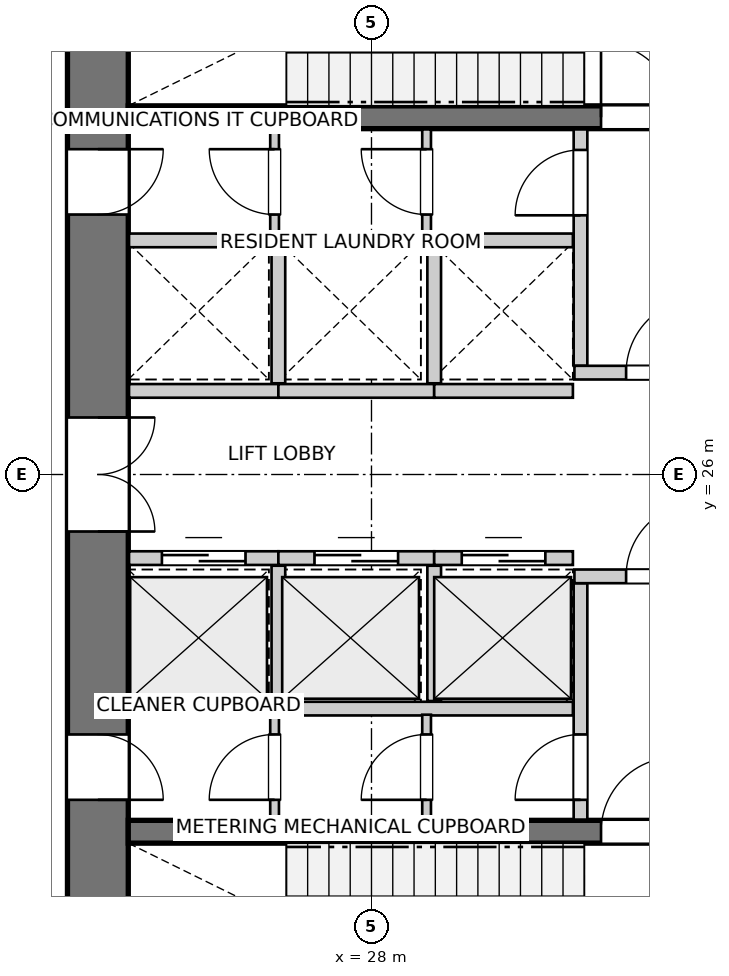
"""IFC4 building model, lengths in metres.
Left out: names, types, materials, properties, quantities, classifications, styles, units other than length and angle.
Written with IfcOpenShell. Run it as: python <this file> out.ifc"""

import sys

from ifc_helpers import new_model, si_unit, direction, frame, frame_2d, origin, place, context, subcontext, project, spatial, rectangle, extrude, source, transform, mapped, element, fill, save


model = new_model("IFC4")
c1 = context("Model", 3, precision=1e-05, world=origin(), true_north=direction((0.0, 1.0)))
c2 = subcontext(c1, "Body", "Model", "MODEL_VIEW")
j1 = project(units=[si_unit("LENGTHUNIT", "METRE"), si_unit("PLANEANGLEUNIT", "RADIAN")], contexts=[c1])
p1 = place(None, origin())
s1 = spatial("IfcSite", under=j1, at=p1, CompositionType="ELEMENT")
p2 = place(p1, origin())
s2 = spatial("IfcBuilding", under=s1, at=p2, CompositionType="ELEMENT")
p3 = place(p2, frame((0.0, 0.0, 65.4)))
s3 = spatial("IfcBuildingStorey", under=s2, at=p3, CompositionType="ELEMENT", Elevation=65.4)
p4 = place(p3, frame((24.4, 33.8, 0.0), z_axis=(0.0, 0.0, 1.0), x_axis=(0.0, -1.0, 0.0)))
e1 = element("IfcWall", 1, at=p4, inside=s3, PredefinedType="SHEAR", context=c2, shape_type="SweptSolid", body=[
    extrude(rectangle(XDim=15.6, YDim=0.8, at=frame_2d((7.8, 0.0))), origin(), (0.0, 0.0, 1.0), 4.75),
])
p5 = place(p4, frame((7.05, 0.0, 0.0)))
e2 = element("IfcOpeningElement", 2, at=p5, cuts=e1, PredefinedType="OPENING", context=c2, shape_type="SweptSolid", body=[
    extrude(rectangle(XDim=1.5, YDim=2.15, at=frame_2d((0.75, 1.075))), frame((0.0, 0.41, 0.0), z_axis=(0.0, -1.0, 0.0), x_axis=(1.0, 0.0, 0.0)), (0.0, 0.0, 1.0), 0.82),
])
p6 = place(p4, frame((3.52, 0.0, 0.0)))
e3 = element("IfcOpeningElement", 3, at=p6, cuts=e1, PredefinedType="OPENING", context=c2, shape_type="SweptSolid", body=[
    extrude(rectangle(XDim=0.86, YDim=2.05, at=frame_2d((0.43, 1.025))), frame((0.0, 0.41, 0.0), z_axis=(0.0, -1.0, 0.0), x_axis=(1.0, 0.0, 0.0)), (0.0, 0.0, 1.0), 0.82),
])
p7 = place(p4, frame((11.22, 0.0, 0.0)))
e4 = element("IfcOpeningElement", 4, at=p7, cuts=e1, PredefinedType="OPENING", context=c2, shape_type="SweptSolid", body=[
    extrude(rectangle(XDim=0.86, YDim=2.05, at=frame_2d((0.43, 1.025))), frame((0.0, 0.41, 0.0), z_axis=(0.0, -1.0, 0.0), x_axis=(1.0, 0.0, 0.0)), (0.0, 0.0, 1.0), 0.82),
])
p8 = place(p3, frame((24.8, 21.3, 0.0), z_axis=(0.0, 0.0, 1.0), x_axis=(1.0, 0.0, 0.0)))
e5 = element("IfcWall", 5, at=p8, inside=s3, PredefinedType="SHEAR", context=c2, shape_type="SweptSolid", body=[
    extrude(rectangle(XDim=11.1, YDim=0.3, at=frame_2d((5.55, 0.0))), origin(), (0.0, 0.0, 1.0), 4.75),
])
p9 = place(p8, frame((6.22, 0.0, 0.0)))
e6 = element("IfcOpeningElement", 6, at=p9, cuts=e5, PredefinedType="OPENING", context=c2, shape_type="SweptSolid", body=[
    extrude(rectangle(XDim=0.98, YDim=2.15, at=frame_2d((0.49, 1.075))), frame((0.0, 0.16, 0.0), z_axis=(0.0, -1.0, 0.0), x_axis=(1.0, 0.0, 0.0)), (0.0, 0.0, 1.0), 0.32),
])
p10 = place(p8, frame((9.15, 0.0, 0.0)))
e7 = element("IfcOpeningElement", 7, at=p10, cuts=e5, PredefinedType="OPENING", context=c2, shape_type="SweptSolid", body=[
    extrude(rectangle(XDim=1.15, YDim=2.15, at=frame_2d((0.575, 1.075))), frame((0.0, 0.16, 0.0), z_axis=(0.0, -1.0, 0.0), x_axis=(1.0, 0.0, 0.0)), (0.0, 0.0, 1.0), 0.32),
])
p11 = place(p3, frame((24.8, 30.7, 0.0), z_axis=(0.0, 0.0, 1.0), x_axis=(1.0, 0.0, 0.0)))
e8 = element("IfcWall", 8, at=p11, inside=s3, PredefinedType="SHEAR", context=c2, shape_type="SweptSolid", body=[
    extrude(rectangle(XDim=11.1, YDim=0.3, at=frame_2d((5.55, 0.0))), origin(), (0.0, 0.0, 1.0), 4.75),
])
p12 = place(p11, frame((6.22, 0.0, 0.0)))
e9 = element("IfcOpeningElement", 9, at=p12, cuts=e8, PredefinedType="OPENING", context=c2, shape_type="SweptSolid", body=[
    extrude(rectangle(XDim=0.98, YDim=2.15, at=frame_2d((0.49, 1.075))), frame((0.0, 0.16, 0.0), z_axis=(0.0, -1.0, 0.0), x_axis=(1.0, 0.0, 0.0)), (0.0, 0.0, 1.0), 0.32),
])
p13 = place(p11, frame((9.15, 0.0, 0.0)))
e10 = element("IfcOpeningElement", 10, at=p13, cuts=e8, PredefinedType="OPENING", context=c2, shape_type="SweptSolid", body=[
    extrude(rectangle(XDim=1.15, YDim=2.15, at=frame_2d((0.575, 1.075))), frame((0.0, 0.16, 0.0), z_axis=(0.0, -1.0, 0.0), x_axis=(1.0, 0.0, 0.0)), (0.0, 0.0, 1.0), 0.32),
])
p14 = place(p3, frame((30.75, 21.46, 0.0), z_axis=(0.0, 0.0, 1.0), x_axis=(0.0, 1.0, 0.0)))
e11 = element("IfcWall", 11, at=p14, inside=s3, PredefinedType="PARTITIONING", context=c2, shape_type="SweptSolid", body=[
    extrude(rectangle(XDim=3.11, YDim=0.18, at=frame_2d((1.555, 0.0))), origin(), (0.0, 0.0, 1.0), 4.75),
])
p15 = place(p14, frame((0.26, 0.0, 0.0)))
e12 = element("IfcOpeningElement", 12, at=p15, cuts=e11, PredefinedType="OPENING", context=c2, shape_type="SweptSolid", body=[
    extrude(rectangle(XDim=0.86, YDim=2.05, at=frame_2d((0.43, 1.025))), frame((0.0, 0.1, 0.0), z_axis=(0.0, -1.0, 0.0), x_axis=(1.0, 0.0, 0.0)), (0.0, 0.0, 1.0), 0.2),
])
p16 = place(p3, frame((30.67, 24.66, 0.0), z_axis=(0.0, 0.0, 1.0), x_axis=(1.0, 0.0, 0.0)))
e13 = element("IfcWall", 13, at=p16, inside=s3, PredefinedType="PARTITIONING", context=c2, shape_type="SweptSolid", body=[
    extrude(rectangle(XDim=5.22, YDim=0.18, at=frame_2d((2.61, 0.0))), origin(), (0.0, 0.0, 1.0), 4.75),
])
p17 = place(p16, frame((0.68, 0.0, 0.0)))
e14 = element("IfcOpeningElement", 14, at=p17, cuts=e13, PredefinedType="OPENING", context=c2, shape_type="SweptSolid", body=[
    extrude(rectangle(XDim=0.98, YDim=2.15, at=frame_2d((0.49, 1.075))), frame((0.0, 0.1, 0.0), z_axis=(0.0, -1.0, 0.0), x_axis=(1.0, 0.0, 0.0)), (0.0, 0.0, 1.0), 0.2),
])
p18 = place(p3, frame((30.75, 27.43, 0.0), z_axis=(0.0, 0.0, 1.0), x_axis=(0.0, 1.0, 0.0)))
e15 = element("IfcWall", 15, at=p18, inside=s3, PredefinedType="PARTITIONING", context=c2, shape_type="SweptSolid", body=[
    extrude(rectangle(XDim=3.11, YDim=0.18, at=frame_2d((1.555, 0.0))), origin(), (0.0, 0.0, 1.0), 4.75),
])
p19 = place(p18, frame((1.98, 0.0, 0.0)))
e16 = element("IfcOpeningElement", 16, at=p19, cuts=e15, PredefinedType="OPENING", context=c2, shape_type="SweptSolid", body=[
    extrude(rectangle(XDim=0.86, YDim=2.05, at=frame_2d((0.43, 1.025))), frame((0.0, 0.1, 0.0), z_axis=(0.0, -1.0, 0.0), x_axis=(1.0, 0.0, 0.0)), (0.0, 0.0, 1.0), 0.2),
])
p20 = place(p3, frame((30.67, 27.34, 0.0), z_axis=(0.0, 0.0, 1.0), x_axis=(1.0, 0.0, 0.0)))
e17 = element("IfcWall", 17, at=p20, inside=s3, PredefinedType="PARTITIONING", context=c2, shape_type="SweptSolid", body=[
    extrude(rectangle(XDim=5.22, YDim=0.18, at=frame_2d((2.61, 0.0))), origin(), (0.0, 0.0, 1.0), 4.75),
])
p21 = place(p20, frame((0.68, 0.0, 0.0)))
e18 = element("IfcOpeningElement", 18, at=p21, cuts=e17, PredefinedType="OPENING", context=c2, shape_type="SweptSolid", body=[
    extrude(rectangle(XDim=0.98, YDim=2.15, at=frame_2d((0.49, 1.075))), frame((0.0, 0.1, 0.0), z_axis=(0.0, -1.0, 0.0), x_axis=(1.0, 0.0, 0.0)), (0.0, 0.0, 1.0), 0.2),
])
p22 = place(p3, frame((24.81, 22.92, 0.0), z_axis=(0.0, 0.0, 1.0), x_axis=(1.0, 0.0, 0.0)))
e19 = element("IfcWall", 19, at=p22, inside=s3, PredefinedType="PARTITIONING", context=c2, shape_type="SweptSolid", body=[
    extrude(rectangle(XDim=5.84, YDim=0.18, at=frame_2d((2.92, 0.0))), origin(), (0.0, 0.0, 1.0), 4.75),
])
p23 = place(p3, frame((24.81, 24.9, 0.0), z_axis=(0.0, 0.0, 1.0), x_axis=(1.0, 0.0, 0.0)))
e20 = element("IfcWall", 20, at=p23, inside=s3, PredefinedType="PARTITIONING", context=c2, shape_type="SweptSolid", body=[
    extrude(rectangle(XDim=1.965, YDim=0.18, at=frame_2d((0.982, 0.0))), origin(), (0.0, 0.0, 1.0), 4.75),
])
p24 = place(p23, frame((0.433, 0.0, 0.0)))
e21 = element("IfcOpeningElement", 21, at=p24, cuts=e20, PredefinedType="OPENING", context=c2, shape_type="SweptSolid", body=[
    extrude(rectangle(XDim=1.1, YDim=2.15, at=frame_2d((0.55, 1.075))), frame((0.0, 0.1, 0.0), z_axis=(0.0, -1.0, 0.0), x_axis=(1.0, 0.0, 0.0)), (0.0, 0.0, 1.0), 0.2),
])
p25 = place(p3, frame((26.775, 24.9, 0.0), z_axis=(0.0, 0.0, 1.0), x_axis=(1.0, 0.0, 0.0)))
e22 = element("IfcWall", 22, at=p25, inside=s3, PredefinedType="PARTITIONING", context=c2, shape_type="SweptSolid", body=[
    extrude(rectangle(XDim=2.05, YDim=0.18, at=frame_2d((1.025, 0.0))), origin(), (0.0, 0.0, 1.0), 4.75),
])
p26 = place(p25, frame((0.475, 0.0, 0.0)))
e23 = element("IfcOpeningElement", 23, at=p26, cuts=e22, PredefinedType="OPENING", context=c2, shape_type="SweptSolid", body=[
    extrude(rectangle(XDim=1.1, YDim=2.15, at=frame_2d((0.55, 1.075))), frame((0.0, 0.1, 0.0), z_axis=(0.0, -1.0, 0.0), x_axis=(1.0, 0.0, 0.0)), (0.0, 0.0, 1.0), 0.2),
])
p27 = place(p3, frame((26.775, 23.02, 0.0), z_axis=(0.0, 0.0, 1.0), x_axis=(0.0, 1.0, 0.0)))
e24 = element("IfcWall", 24, at=p27, inside=s3, PredefinedType="PARTITIONING", context=c2, shape_type="SweptSolid", body=[
    extrude(rectangle(XDim=1.78, YDim=0.18, at=frame_2d((0.89, 0.0))), origin(), (0.0, 0.0, 1.0), 4.75),
])
p28 = place(p3, frame((28.825, 24.9, 0.0), z_axis=(0.0, 0.0, 1.0), x_axis=(1.0, 0.0, 0.0)))
e25 = element("IfcWall", 25, at=p28, inside=s3, PredefinedType="PARTITIONING", context=c2, shape_type="SweptSolid", body=[
    extrude(rectangle(XDim=1.825, YDim=0.18, at=frame_2d((0.913, 0.0))), origin(), (0.0, 0.0, 1.0), 4.75),
])
p29 = place(p28, frame((0.363, 0.0, 0.0)))
e26 = element("IfcOpeningElement", 26, at=p29, cuts=e25, PredefinedType="OPENING", context=c2, shape_type="SweptSolid", body=[
    extrude(rectangle(XDim=1.1, YDim=2.15, at=frame_2d((0.55, 1.075))), frame((0.0, 0.1, 0.0), z_axis=(0.0, -1.0, 0.0), x_axis=(1.0, 0.0, 0.0)), (0.0, 0.0, 1.0), 0.2),
])
p30 = place(p3, frame((28.825, 23.02, 0.0), z_axis=(0.0, 0.0, 1.0), x_axis=(0.0, 1.0, 0.0)))
e27 = element("IfcWall", 27, at=p30, inside=s3, PredefinedType="PARTITIONING", context=c2, shape_type="SweptSolid", body=[
    extrude(rectangle(XDim=1.78, YDim=0.18, at=frame_2d((0.89, 0.0))), origin(), (0.0, 0.0, 1.0), 4.75),
])
p31 = place(p3, frame((24.81, 29.08, 0.0), z_axis=(0.0, 0.0, 1.0), x_axis=(1.0, 0.0, 0.0)))
e28 = element("IfcWall", 28, at=p31, inside=s3, PredefinedType="PARTITIONING", context=c2, shape_type="SweptSolid", body=[
    extrude(rectangle(XDim=5.84, YDim=0.18, at=frame_2d((2.92, 0.0))), origin(), (0.0, 0.0, 1.0), 4.75),
])
p32 = place(p3, frame((24.81, 27.1, 0.0), z_axis=(0.0, 0.0, 1.0), x_axis=(1.0, 0.0, 0.0)))
e29 = element("IfcWall", 29, at=p32, inside=s3, PredefinedType="PARTITIONING", context=c2, shape_type="SweptSolid", body=[
    extrude(rectangle(XDim=1.965, YDim=0.18, at=frame_2d((0.982, 0.0))), origin(), (0.0, 0.0, 1.0), 4.75),
])
p33 = place(p3, frame((26.775, 27.1, 0.0), z_axis=(0.0, 0.0, 1.0), x_axis=(1.0, 0.0, 0.0)))
e30 = element("IfcWall", 30, at=p33, inside=s3, PredefinedType="PARTITIONING", context=c2, shape_type="SweptSolid", body=[
    extrude(rectangle(XDim=2.05, YDim=0.18, at=frame_2d((1.025, 0.0))), origin(), (0.0, 0.0, 1.0), 4.75),
])
p34 = place(p3, frame((26.775, 27.2, 0.0), z_axis=(0.0, 0.0, 1.0), x_axis=(0.0, 1.0, 0.0)))
e31 = element("IfcWall", 31, at=p34, inside=s3, PredefinedType="PARTITIONING", context=c2, shape_type="SweptSolid", body=[
    extrude(rectangle(XDim=1.78, YDim=0.18, at=frame_2d((0.89, 0.0))), origin(), (0.0, 0.0, 1.0), 4.75),
])
p35 = place(p3, frame((28.825, 27.1, 0.0), z_axis=(0.0, 0.0, 1.0), x_axis=(1.0, 0.0, 0.0)))
e32 = element("IfcWall", 32, at=p35, inside=s3, PredefinedType="PARTITIONING", context=c2, shape_type="SweptSolid", body=[
    extrude(rectangle(XDim=1.825, YDim=0.18, at=frame_2d((0.913, 0.0))), origin(), (0.0, 0.0, 1.0), 4.75),
])
p36 = place(p3, frame((28.825, 27.2, 0.0), z_axis=(0.0, 0.0, 1.0), x_axis=(0.0, 1.0, 0.0)))
e33 = element("IfcWall", 33, at=p36, inside=s3, PredefinedType="PARTITIONING", context=c2, shape_type="SweptSolid", body=[
    extrude(rectangle(XDim=1.78, YDim=0.18, at=frame_2d((0.89, 0.0))), origin(), (0.0, 0.0, 1.0), 4.75),
])
p37 = place(p3, frame((26.725, 21.46, 0.0), z_axis=(0.0, 0.0, 1.0), x_axis=(0.0, 1.0, 0.0)))
e34 = element("IfcWall", 34, at=p37, inside=s3, PredefinedType="PARTITIONING", context=c2, shape_type="SweptSolid", body=[
    extrude(rectangle(XDim=1.38, YDim=0.115, at=frame_2d((0.69, 0.0))), origin(), (0.0, 0.0, 1.0), 4.75),
])
p38 = place(p37, frame((0.26, 0.0, 0.0)))
e35 = element("IfcOpeningElement", 35, at=p38, cuts=e34, PredefinedType="OPENING", context=c2, shape_type="SweptSolid", body=[
    extrude(rectangle(XDim=0.86, YDim=2.05, at=frame_2d((0.43, 1.025))), frame((0.0, 0.067, 0.0), z_axis=(0.0, -1.0, 0.0), x_axis=(1.0, 0.0, 0.0)), (0.0, 0.0, 1.0), 0.135),
])
p39 = place(p3, frame((26.725, 29.16, 0.0), z_axis=(0.0, 0.0, 1.0), x_axis=(0.0, 1.0, 0.0)))
e36 = element("IfcWall", 36, at=p39, inside=s3, PredefinedType="PARTITIONING", context=c2, shape_type="SweptSolid", body=[
    extrude(rectangle(XDim=1.38, YDim=0.115, at=frame_2d((0.69, 0.0))), origin(), (0.0, 0.0, 1.0), 4.75),
])
p40 = place(p39, frame((0.26, 0.0, 0.0)))
e37 = element("IfcOpeningElement", 37, at=p40, cuts=e36, PredefinedType="OPENING", context=c2, shape_type="SweptSolid", body=[
    extrude(rectangle(XDim=0.86, YDim=2.05, at=frame_2d((0.43, 1.025))), frame((0.0, 0.067, 0.0), z_axis=(0.0, -1.0, 0.0), x_axis=(1.0, 0.0, 0.0)), (0.0, 0.0, 1.0), 0.135),
])
p41 = place(p3, frame((28.725, 21.46, 0.0), z_axis=(0.0, 0.0, 1.0), x_axis=(0.0, 1.0, 0.0)))
e38 = element("IfcWall", 38, at=p41, inside=s3, PredefinedType="PARTITIONING", context=c2, shape_type="SweptSolid", body=[
    extrude(rectangle(XDim=1.38, YDim=0.115, at=frame_2d((0.69, 0.0))), origin(), (0.0, 0.0, 1.0), 4.75),
])
p42 = place(p41, frame((0.26, 0.0, 0.0)))
e39 = element("IfcOpeningElement", 39, at=p42, cuts=e38, PredefinedType="OPENING", context=c2, shape_type="SweptSolid", body=[
    extrude(rectangle(XDim=0.86, YDim=2.05, at=frame_2d((0.43, 1.025))), frame((0.0, 0.067, 0.0), z_axis=(0.0, -1.0, 0.0), x_axis=(1.0, 0.0, 0.0)), (0.0, 0.0, 1.0), 0.135),
])
p43 = place(p3, frame((28.725, 29.16, 0.0), z_axis=(0.0, 0.0, 1.0), x_axis=(0.0, 1.0, 0.0)))
e40 = element("IfcWall", 40, at=p43, inside=s3, PredefinedType="PARTITIONING", context=c2, shape_type="SweptSolid", body=[
    extrude(rectangle(XDim=1.38, YDim=0.115, at=frame_2d((0.69, 0.0))), origin(), (0.0, 0.0, 1.0), 4.75),
])
p44 = place(p43, frame((0.26, 0.0, 0.0)))
e41 = element("IfcOpeningElement", 41, at=p44, cuts=e40, PredefinedType="OPENING", context=c2, shape_type="SweptSolid", body=[
    extrude(rectangle(XDim=0.86, YDim=2.05, at=frame_2d((0.43, 1.025))), frame((0.0, 0.067, 0.0), z_axis=(0.0, -1.0, 0.0), x_axis=(1.0, 0.0, 0.0)), (0.0, 0.0, 1.0), 0.135),
])
m1 = source(origin(), c2, "Body", "SweptSolid", [
    extrude(rectangle(XDim=0.98, YDim=2.15, at=frame_2d((0.49, 1.075))), frame((0.0, 0.025, 0.0), z_axis=(0.0, -1.0, 0.0), x_axis=(1.0, 0.0, 0.0)), (0.0, 0.0, 1.0), 0.05),
])
p45 = place(p9, origin())
e42 = element("IfcDoor", 42, at=p45, inside=s3, OperationType="SINGLE_SWING_RIGHT", PredefinedType="DOOR", context=c2, shape_type="MappedRepresentation", body=[
    mapped(m1, transform((0.0, 0.0, 0.0), x_axis=(1.0, 0.0, 0.0), y_axis=(0.0, 1.0, 0.0), z_axis=(0.0, 0.0, 1.0), scale=1.0)),
])
fill(e6, e42)
p46 = place(p12, origin())
e43 = element("IfcDoor", 43, at=p46, inside=s3, OperationType="SINGLE_SWING_LEFT", PredefinedType="DOOR", context=c2, shape_type="MappedRepresentation", body=[
    mapped(m1, transform((0.0, 0.0, 0.0), x_axis=(1.0, 0.0, 0.0), y_axis=(0.0, 1.0, 0.0), z_axis=(0.0, 0.0, 1.0), scale=1.0)),
])
fill(e9, e43)
m2 = source(origin(), c2, "Body", "SweptSolid", [
    extrude(rectangle(XDim=1.5, YDim=2.15, at=frame_2d((0.75, 1.075))), frame((0.0, 0.025, 0.0), z_axis=(0.0, -1.0, 0.0), x_axis=(1.0, 0.0, 0.0)), (0.0, 0.0, 1.0), 0.05),
])
p47 = place(p5, origin())
e44 = element("IfcDoor", 44, at=p47, inside=s3, OperationType="DOUBLE_DOOR_SINGLE_SWING", PredefinedType="DOOR", context=c2, shape_type="MappedRepresentation", body=[
    mapped(m2, transform((0.0, 0.0, 0.0), x_axis=(1.0, 0.0, 0.0), y_axis=(0.0, 1.0, 0.0), z_axis=(0.0, 0.0, 1.0), scale=1.0)),
])
fill(e2, e44)
m3 = source(origin(), c2, "Body", "SweptSolid", [
    extrude(rectangle(XDim=0.86, YDim=2.05, at=frame_2d((0.43, 1.025))), frame((0.0, 0.025, 0.0), z_axis=(0.0, -1.0, 0.0), x_axis=(1.0, 0.0, 0.0)), (0.0, 0.0, 1.0), 0.05),
])
p48 = place(p6, origin())
e45 = element("IfcDoor", 45, at=p48, inside=s3, OperationType="SINGLE_SWING_LEFT", PredefinedType="DOOR", context=c2, shape_type="MappedRepresentation", body=[
    mapped(m3, transform((0.0, 0.0, 0.0), x_axis=(1.0, 0.0, 0.0), y_axis=(0.0, 1.0, 0.0), z_axis=(0.0, 0.0, 1.0), scale=1.0)),
])
fill(e3, e45)
p49 = place(p7, origin())
e46 = element("IfcDoor", 46, at=p49, inside=s3, OperationType="SINGLE_SWING_RIGHT", PredefinedType="DOOR", context=c2, shape_type="MappedRepresentation", body=[
    mapped(m3, transform((0.0, 0.0, 0.0), x_axis=(1.0, 0.0, 0.0), y_axis=(0.0, 1.0, 0.0), z_axis=(0.0, 0.0, 1.0), scale=1.0)),
])
fill(e4, e46)
p50 = place(p15, origin())
e47 = element("IfcDoor", 47, at=p50, inside=s3, OperationType="SINGLE_SWING_LEFT", PredefinedType="DOOR", context=c2, shape_type="MappedRepresentation", body=[
    mapped(m3, transform((0.0, 0.0, 0.0), x_axis=(1.0, 0.0, 0.0), y_axis=(0.0, 1.0, 0.0), z_axis=(0.0, 0.0, 1.0), scale=1.0)),
])
fill(e12, e47)
p51 = place(p17, origin())
e48 = element("IfcDoor", 48, at=p51, inside=s3, OperationType="SINGLE_SWING_RIGHT", PredefinedType="DOOR", context=c2, shape_type="MappedRepresentation", body=[
    mapped(m1, transform((0.0, 0.0, 0.0), x_axis=(1.0, 0.0, 0.0), y_axis=(0.0, 1.0, 0.0), z_axis=(0.0, 0.0, 1.0), scale=1.0)),
])
fill(e14, e48)
p52 = place(p19, origin())
e49 = element("IfcDoor", 49, at=p52, inside=s3, OperationType="SINGLE_SWING_LEFT", PredefinedType="DOOR", context=c2, shape_type="MappedRepresentation", body=[
    mapped(m3, transform((0.0, 0.0, 0.0), x_axis=(1.0, 0.0, 0.0), y_axis=(0.0, 1.0, 0.0), z_axis=(0.0, 0.0, 1.0), scale=1.0)),
])
fill(e16, e49)
p53 = place(p21, origin())
e50 = element("IfcDoor", 50, at=p53, inside=s3, OperationType="SINGLE_SWING_RIGHT", PredefinedType="DOOR", context=c2, shape_type="MappedRepresentation", body=[
    mapped(m1, transform((0.0, 0.0, 0.0), x_axis=(1.0, 0.0, 0.0), y_axis=(0.0, 1.0, 0.0), z_axis=(0.0, 0.0, 1.0), scale=1.0)),
])
fill(e18, e50)
m4 = source(origin(), c2, "Body", "SweptSolid", [
    extrude(rectangle(XDim=1.1, YDim=2.15, at=frame_2d((0.55, 1.075))), frame((0.0, 0.025, 0.0), z_axis=(0.0, -1.0, 0.0), x_axis=(1.0, 0.0, 0.0)), (0.0, 0.0, 1.0), 0.05),
])
p54 = place(p24, origin())
e51 = element("IfcDoor", 51, at=p54, inside=s3, OperationType="DOUBLE_DOOR_SLIDING", PredefinedType="DOOR", context=c2, shape_type="MappedRepresentation", body=[
    mapped(m4, transform((0.0, 0.0, 0.0), x_axis=(1.0, 0.0, 0.0), y_axis=(0.0, 1.0, 0.0), z_axis=(0.0, 0.0, 1.0), scale=1.0)),
])
fill(e21, e51)
p55 = place(p26, origin())
e52 = element("IfcDoor", 52, at=p55, inside=s3, OperationType="DOUBLE_DOOR_SLIDING", PredefinedType="DOOR", context=c2, shape_type="MappedRepresentation", body=[
    mapped(m4, transform((0.0, 0.0, 0.0), x_axis=(1.0, 0.0, 0.0), y_axis=(0.0, 1.0, 0.0), z_axis=(0.0, 0.0, 1.0), scale=1.0)),
])
fill(e23, e52)
p56 = place(p29, origin())
e53 = element("IfcDoor", 53, at=p56, inside=s3, OperationType="DOUBLE_DOOR_SLIDING", PredefinedType="DOOR", context=c2, shape_type="MappedRepresentation", body=[
    mapped(m4, transform((0.0, 0.0, 0.0), x_axis=(1.0, 0.0, 0.0), y_axis=(0.0, 1.0, 0.0), z_axis=(0.0, 0.0, 1.0), scale=1.0)),
])
fill(e26, e53)
p57 = place(p38, origin())
e54 = element("IfcDoor", 54, at=p57, inside=s3, OperationType="SINGLE_SWING_LEFT", PredefinedType="DOOR", context=c2, shape_type="MappedRepresentation", body=[
    mapped(m3, transform((0.0, 0.0, 0.0), x_axis=(1.0, 0.0, 0.0), y_axis=(0.0, 1.0, 0.0), z_axis=(0.0, 0.0, 1.0), scale=1.0)),
])
fill(e35, e54)
p58 = place(p40, origin())
e55 = element("IfcDoor", 55, at=p58, inside=s3, OperationType="SINGLE_SWING_RIGHT", PredefinedType="DOOR", context=c2, shape_type="MappedRepresentation", body=[
    mapped(m3, transform((0.0, 0.0, 0.0), x_axis=(1.0, 0.0, 0.0), y_axis=(0.0, 1.0, 0.0), z_axis=(0.0, 0.0, 1.0), scale=1.0)),
])
fill(e37, e55)
p59 = place(p42, origin())
e56 = element("IfcDoor", 56, at=p59, inside=s3, OperationType="SINGLE_SWING_LEFT", PredefinedType="DOOR", context=c2, shape_type="MappedRepresentation", body=[
    mapped(m3, transform((0.0, 0.0, 0.0), x_axis=(1.0, 0.0, 0.0), y_axis=(0.0, 1.0, 0.0), z_axis=(0.0, 0.0, 1.0), scale=1.0)),
])
fill(e39, e56)
p60 = place(p44, origin())
e57 = element("IfcDoor", 57, at=p60, inside=s3, OperationType="SINGLE_SWING_RIGHT", PredefinedType="DOOR", context=c2, shape_type="MappedRepresentation", body=[
    mapped(m3, transform((0.0, 0.0, 0.0), x_axis=(1.0, 0.0, 0.0), y_axis=(0.0, 1.0, 0.0), z_axis=(0.0, 0.0, 1.0), scale=1.0)),
])
fill(e41, e57)
save(model, sys.argv[1])
